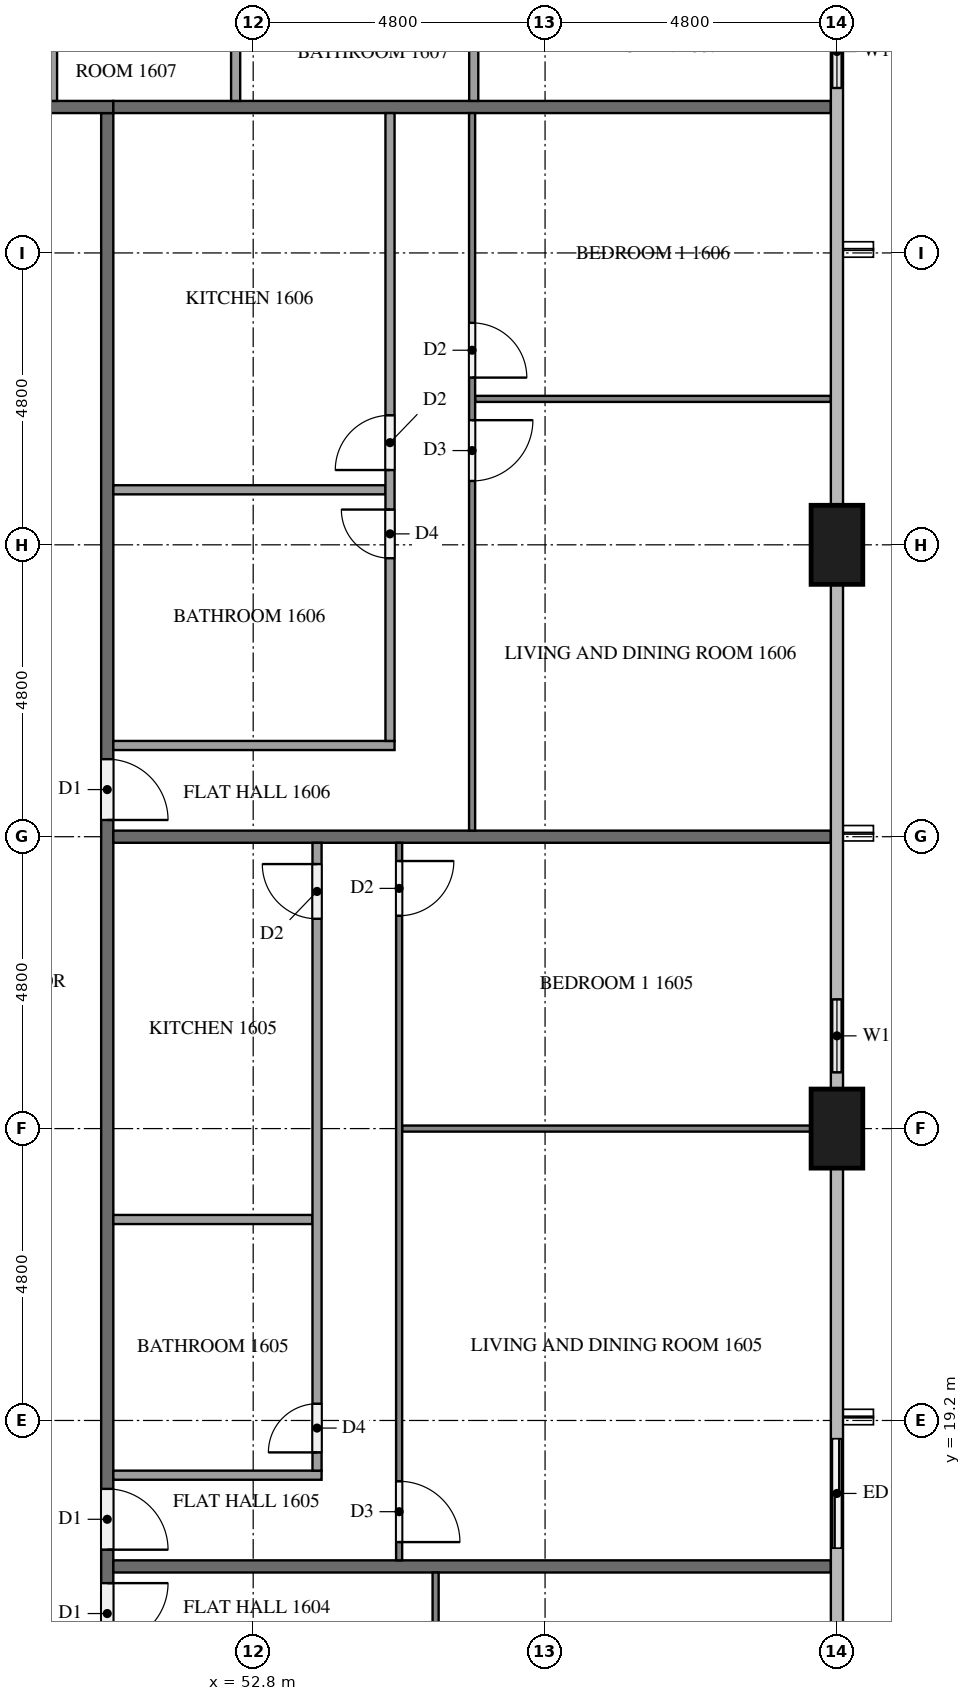
"""IFC4 building model, lengths in metres.
Left out: names, types, materials, properties, quantities, classifications, styles, units other than length and angle.
Written with IfcOpenShell. Run it as: python <this file> out.ifc"""

import sys

from ifc_helpers import new_model, si_unit, direction, frame, frame_2d, origin, origin_2d, place, context, subcontext, project, spatial, rectangle, extrude, element, fill, save


model = new_model("IFC4")
c1 = context("Model", 3, precision=1e-05, world=origin(), true_north=direction((0.0, 1.0)))
c2 = subcontext(c1, "Body", "Model", "MODEL_VIEW")
j1 = project(units=[si_unit("LENGTHUNIT", "METRE"), si_unit("PLANEANGLEUNIT", "RADIAN")], contexts=[c1])
p1 = place(None, origin())
s1 = spatial("IfcSite", under=j1, at=p1, CompositionType="ELEMENT")
p2 = place(p1, origin())
s2 = spatial("IfcBuilding", under=s1, at=p2, CompositionType="ELEMENT")
p3 = place(p2, frame((0.0, 0.0, 66.3)))
s3 = spatial("IfcBuildingStorey", under=s2, at=p3, CompositionType="ELEMENT", Elevation=66.3)
for number, where, z_axis, x_axis in (
    (1, (62.4, 24.0, 0.0), (0.0, 0.0, 1.0), (0.0, 1.0, 0.0)),
    (2, (62.4, 33.6, 0.0), (0.0, 0.0, 1.0), (0.0, 1.0, 0.0)),
):
    element("IfcColumn", number, at=place(p3, frame(where, z_axis=z_axis, x_axis=x_axis)), inside=s3, PredefinedType="COLUMN", context=c2, shape_type="SweptSolid", body=[
        extrude(rectangle(XDim=1.3, YDim=0.85, at=origin_2d()), origin(), (0.0, 0.0, 1.0), 3.2),
    ])
p4 = place(p3, frame((62.4, 16.8, 0.0), z_axis=(0.0, 0.0, 1.0), x_axis=(0.0, 1.0, 0.0)))
e3 = element("IfcWall", 3, at=p4, inside=s3, PredefinedType="SOLIDWALL", context=c2, shape_type="SweptSolid", body=[
    extrude(rectangle(XDim=2.4, YDim=0.15, at=frame_2d((1.2, 0.0))), origin(), (0.0, 0.0, 1.0), 3.2),
])
p5 = place(p4, frame((0.3, 0.0, 0.0)))
e4 = element("IfcOpeningElement", 4, at=p5, cuts=e3, PredefinedType="OPENING", context=c2, shape_type="SweptSolid", body=[
    extrude(rectangle(XDim=1.8, YDim=2.4, at=frame_2d((0.9, 1.2))), frame((0.0, 0.085, 0.0), z_axis=(0.0, -1.0, 0.0), x_axis=(1.0, 0.0, 0.0)), (0.0, 0.0, 1.0), 0.17),
])
p6 = place(p3, frame((62.4, 24.65, 0.0), z_axis=(0.0, 0.0, 1.0), x_axis=(0.0, 1.0, 0.0)))
e5 = element("IfcWall", 5, at=p6, inside=s3, PredefinedType="SOLIDWALL", context=c2, shape_type="SweptSolid", body=[
    extrude(rectangle(XDim=1.75, YDim=0.15, at=frame_2d((0.875, 0.0))), origin(), (0.0, 0.0, 1.0), 3.2),
])
p7 = place(p6, frame((0.275, 0.0, 0.9)))
e6 = element("IfcOpeningElement", 6, at=p7, cuts=e5, PredefinedType="OPENING", context=c2, shape_type="SweptSolid", body=[
    extrude(rectangle(XDim=1.2, YDim=1.4, at=frame_2d((0.6, 0.7))), frame((0.0, 0.085, 0.0), z_axis=(0.0, -1.0, 0.0), x_axis=(1.0, 0.0, 0.0)), (0.0, 0.0, 1.0), 0.17),
])
p8 = place(p3, frame((62.4, 40.8, 0.0), z_axis=(0.0, 0.0, 1.0), x_axis=(0.0, 1.0, 0.0)))
e7 = element("IfcWall", 7, at=p8, inside=s3, PredefinedType="SOLIDWALL", context=c2, shape_type="SweptSolid", body=[
    extrude(rectangle(XDim=1.825, YDim=0.15, at=frame_2d((0.913, 0.0))), origin(), (0.0, 0.0, 1.0), 3.2),
])
p9 = place(p8, frame((0.312, 0.0, 0.9)))
e8 = element("IfcOpeningElement", 8, at=p9, cuts=e7, PredefinedType="OPENING", context=c2, shape_type="SweptSolid", body=[
    extrude(rectangle(XDim=1.2, YDim=1.4, at=frame_2d((0.6, 0.7))), frame((0.0, 0.085, 0.0), z_axis=(0.0, -1.0, 0.0), x_axis=(1.0, 0.0, 0.0)), (0.0, 0.0, 1.0), 0.17),
])
p10 = place(p3, frame((50.4, 40.7, 0.0), z_axis=(0.0, 0.0, 1.0), x_axis=(0.0, -1.0, 0.0)))
e9 = element("IfcWall", 9, at=p10, inside=s3, PredefinedType="PARTITIONING", context=c2, shape_type="SweptSolid", body=[
    extrude(rectangle(XDim=28.6, YDim=0.2, at=frame_2d((14.3, 0.0))), origin(), (0.0, 0.0, 1.0), 3.2),
])
p11 = place(p10, frame((24.175, 0.0, 0.0)))
e10 = element("IfcOpeningElement", 10, at=p11, cuts=e9, PredefinedType="OPENING", context=c2, shape_type="SweptSolid", body=[
    extrude(rectangle(XDim=1.0, YDim=2.1, at=frame_2d((0.5, 1.05))), frame((0.0, 0.11, 0.0), z_axis=(0.0, -1.0, 0.0), x_axis=(1.0, 0.0, 0.0)), (0.0, 0.0, 1.0), 0.22),
])
p12 = place(p10, frame((22.625, 0.0, 0.0)))
e11 = element("IfcOpeningElement", 11, at=p12, cuts=e9, PredefinedType="OPENING", context=c2, shape_type="SweptSolid", body=[
    extrude(rectangle(XDim=1.0, YDim=2.1, at=frame_2d((0.5, 1.05))), frame((0.0, 0.11, 0.0), z_axis=(0.0, -1.0, 0.0), x_axis=(1.0, 0.0, 0.0)), (0.0, 0.0, 1.0), 0.22),
])
p13 = place(p10, frame((10.625, 0.0, 0.0)))
e12 = element("IfcOpeningElement", 12, at=p13, cuts=e9, PredefinedType="OPENING", context=c2, shape_type="SweptSolid", body=[
    extrude(rectangle(XDim=1.0, YDim=2.1, at=frame_2d((0.5, 1.05))), frame((0.0, 0.11, 0.0), z_axis=(0.0, -1.0, 0.0), x_axis=(1.0, 0.0, 0.0)), (0.0, 0.0, 1.0), 0.22),
])
p14 = place(p3, frame((11.9, 40.8, 0.0), z_axis=(0.0, 0.0, 1.0), x_axis=(1.0, 0.0, 0.0)))
e13 = element("IfcWall", 13, at=p14, inside=s3, PredefinedType="PARTITIONING", context=c2, shape_type="SweptSolid", body=[
    extrude(rectangle(XDim=38.6, YDim=0.2, at=frame_2d((19.3, 0.0))), origin(), (0.0, 0.0, 1.0), 3.2),
])
p15 = place(p14, frame((36.375, 0.0, 0.0)))
e14 = element("IfcOpeningElement", 14, at=p15, cuts=e13, PredefinedType="OPENING", context=c2, shape_type="SweptSolid", body=[
    extrude(rectangle(XDim=1.0, YDim=2.1, at=frame_2d((0.5, 1.05))), frame((0.0, 0.11, 0.0), z_axis=(0.0, -1.0, 0.0), x_axis=(1.0, 0.0, 0.0)), (0.0, 0.0, 1.0), 0.22),
])
p16 = place(p14, frame((17.125, 0.0, 0.0)))
e15 = element("IfcOpeningElement", 15, at=p16, cuts=e13, PredefinedType="OPENING", context=c2, shape_type="SweptSolid", body=[
    extrude(rectangle(XDim=1.1, YDim=2.1, at=frame_2d((0.55, 1.05))), frame((0.0, 0.11, 0.0), z_axis=(0.0, -1.0, 0.0), x_axis=(1.0, 0.0, 0.0)), (0.0, 0.0, 1.0), 0.22),
])
p17 = place(p14, frame((15.625, 0.0, 0.0)))
e16 = element("IfcOpeningElement", 16, at=p17, cuts=e13, PredefinedType="OPENING", context=c2, shape_type="SweptSolid", body=[
    extrude(rectangle(XDim=1.0, YDim=2.1, at=frame_2d((0.5, 1.05))), frame((0.0, 0.11, 0.0), z_axis=(0.0, -1.0, 0.0), x_axis=(1.0, 0.0, 0.0)), (0.0, 0.0, 1.0), 0.22),
])
p18 = place(p14, frame((1.225, 0.0, 0.0)))
e17 = element("IfcOpeningElement", 17, at=p18, cuts=e13, PredefinedType="OPENING", context=c2, shape_type="SweptSolid", body=[
    extrude(rectangle(XDim=1.0, YDim=2.1, at=frame_2d((0.5, 1.05))), frame((0.0, 0.11, 0.0), z_axis=(0.0, -1.0, 0.0), x_axis=(1.0, 0.0, 0.0)), (0.0, 0.0, 1.0), 0.22),
])
for number, where, z_axis, x_axis in (
    (18, (50.5, 16.8, 0.0), (0.0, 0.0, 1.0), (1.0, 0.0, 0.0)),
    (19, (50.5, 28.8, 0.0), (0.0, 0.0, 1.0), (1.0, 0.0, 0.0)),
    (20, (50.5, 40.8, 0.0), (0.0, 0.0, 1.0), (1.0, 0.0, 0.0)),
):
    element("IfcWall", number, at=place(p3, frame(where, z_axis=z_axis, x_axis=x_axis)), inside=s3, PredefinedType="PARTITIONING", context=c2, shape_type="SweptSolid", body=[
        extrude(rectangle(XDim=11.8, YDim=0.2, at=frame_2d((5.9, 0.0))), origin(), (0.0, 0.0, 1.0), 3.2),
    ])
p19 = place(p3, frame((55.8, 16.7, 0.0), z_axis=(0.0, 0.0, 1.0), x_axis=(0.0, -1.0, 0.0)))
e21 = element("IfcWall", 21, at=p19, inside=s3, PredefinedType="PARTITIONING", context=c2, shape_type="SweptSolid", body=[
    extrude(rectangle(XDim=16.6, YDim=0.1, at=frame_2d((8.3, 0.0))), origin(), (0.0, 0.0, 1.0), 3.2),
])
p20 = place(p19, frame((5.75, 0.0, 0.0)))
e22 = element("IfcOpeningElement", 22, at=p20, cuts=e21, PredefinedType="OPENING", context=c2, shape_type="SweptSolid", body=[
    extrude(rectangle(XDim=1.0, YDim=2.1, at=frame_2d((0.5, 1.05))), frame((0.0, 0.06, 0.0), z_axis=(0.0, -1.0, 0.0), x_axis=(1.0, 0.0, 0.0)), (0.0, 0.0, 1.0), 0.12),
])
p21 = place(p19, frame((7.45, 0.0, 0.0)))
e23 = element("IfcOpeningElement", 23, at=p21, cuts=e21, PredefinedType="OPENING", context=c2, shape_type="SweptSolid", body=[
    extrude(rectangle(XDim=0.9, YDim=2.1, at=frame_2d((0.45, 1.05))), frame((0.0, 0.06, 0.0), z_axis=(0.0, -1.0, 0.0), x_axis=(1.0, 0.0, 0.0)), (0.0, 0.0, 1.0), 0.12),
])
p22 = place(p19, frame((15.2, 0.0, 0.0)))
e24 = element("IfcOpeningElement", 24, at=p22, cuts=e21, PredefinedType="OPENING", context=c2, shape_type="SweptSolid", body=[
    extrude(rectangle(XDim=0.9, YDim=2.1, at=frame_2d((0.45, 1.05))), frame((0.0, 0.06, 0.0), z_axis=(0.0, -1.0, 0.0), x_axis=(1.0, 0.0, 0.0)), (0.0, 0.0, 1.0), 0.12),
])
p23 = place(p3, frame((55.25, 24.0, 0.0), z_axis=(0.0, 0.0, 1.0), x_axis=(1.0, 0.0, 0.0)))
e25 = element("IfcWall", 25, at=p23, inside=s3, PredefinedType="PARTITIONING", context=c2, shape_type="SweptSolid", body=[
    extrude(rectangle(XDim=6.725, YDim=0.1, at=frame_2d((3.363, 0.0))), origin(), (0.0, 0.0, 1.0), 3.2),
])
p24 = place(p3, frame((55.2, 28.7, 0.0), z_axis=(0.0, 0.0, 1.0), x_axis=(0.0, -1.0, 0.0)))
e26 = element("IfcWall", 26, at=p24, inside=s3, PredefinedType="PARTITIONING", context=c2, shape_type="SweptSolid", body=[
    extrude(rectangle(XDim=11.8, YDim=0.1, at=frame_2d((5.9, 0.0))), origin(), (0.0, 0.0, 1.0), 3.2),
])
p25 = place(p24, frame((10.5, 0.0, 0.0)))
e27 = element("IfcOpeningElement", 27, at=p25, cuts=e26, PredefinedType="OPENING", context=c2, shape_type="SweptSolid", body=[
    extrude(rectangle(XDim=1.0, YDim=2.1, at=frame_2d((0.5, 1.05))), frame((0.0, 0.06, 0.0), z_axis=(0.0, -1.0, 0.0), x_axis=(1.0, 0.0, 0.0)), (0.0, 0.0, 1.0), 0.12),
])
p26 = place(p24, frame((0.3, 0.0, 0.0)))
e28 = element("IfcOpeningElement", 28, at=p26, cuts=e26, PredefinedType="OPENING", context=c2, shape_type="SweptSolid", body=[
    extrude(rectangle(XDim=0.9, YDim=2.1, at=frame_2d((0.45, 1.05))), frame((0.0, 0.06, 0.0), z_axis=(0.0, -1.0, 0.0), x_axis=(1.0, 0.0, 0.0)), (0.0, 0.0, 1.0), 0.12),
])
p27 = place(p3, frame((50.5, 22.505, 0.0), z_axis=(0.0, 0.0, 1.0), x_axis=(1.0, 0.0, 0.0)))
e29 = element("IfcWall", 29, at=p27, inside=s3, PredefinedType="PARTITIONING", context=c2, shape_type="SweptSolid", body=[
    extrude(rectangle(XDim=3.275, YDim=0.15, at=frame_2d((1.637, 0.0))), origin(), (0.0, 0.0, 1.0), 3.2),
])
p28 = place(p3, frame((50.5, 18.3, 0.0), z_axis=(0.0, 0.0, 1.0), x_axis=(1.0, 0.0, 0.0)))
e30 = element("IfcWall", 30, at=p28, inside=s3, PredefinedType="PARTITIONING", context=c2, shape_type="SweptSolid", body=[
    extrude(rectangle(XDim=3.425, YDim=0.15, at=frame_2d((1.712, 0.0))), origin(), (0.0, 0.0, 1.0), 3.2),
])
p29 = place(p3, frame((53.85, 18.375, 0.0), z_axis=(0.0, 0.0, 1.0), x_axis=(0.0, 1.0, 0.0)))
e31 = element("IfcWall", 31, at=p29, inside=s3, PredefinedType="PARTITIONING", context=c2, shape_type="SweptSolid", body=[
    extrude(rectangle(XDim=10.325, YDim=0.15, at=frame_2d((5.163, 0.0))), origin(), (0.0, 0.0, 1.0), 3.2),
])
p30 = place(p29, frame((0.3, 0.0, 0.0)))
e32 = element("IfcOpeningElement", 32, at=p30, cuts=e31, PredefinedType="OPENING", context=c2, shape_type="SweptSolid", body=[
    extrude(rectangle(XDim=0.8, YDim=2.1, at=frame_2d((0.4, 1.05))), frame((0.0, 0.085, 0.0), z_axis=(0.0, -1.0, 0.0), x_axis=(1.0, 0.0, 0.0)), (0.0, 0.0, 1.0), 0.17),
])
p31 = place(p29, frame((9.075, 0.0, 0.0)))
e33 = element("IfcOpeningElement", 33, at=p31, cuts=e31, PredefinedType="OPENING", context=c2, shape_type="SweptSolid", body=[
    extrude(rectangle(XDim=0.9, YDim=2.1, at=frame_2d((0.45, 1.05))), frame((0.0, 0.085, 0.0), z_axis=(0.0, -1.0, 0.0), x_axis=(1.0, 0.0, 0.0)), (0.0, 0.0, 1.0), 0.17),
])
p32 = place(p3, frame((56.45, 36.0, 0.0), z_axis=(0.0, 0.0, 1.0), x_axis=(1.0, 0.0, 0.0)))
e34 = element("IfcWall", 34, at=p32, inside=s3, PredefinedType="PARTITIONING", context=c2, shape_type="SweptSolid", body=[
    extrude(rectangle(XDim=5.85, YDim=0.1, at=frame_2d((2.925, 0.0))), origin(), (0.0, 0.0, 1.0), 3.2),
])
p33 = place(p3, frame((56.4, 40.7, 0.0), z_axis=(0.0, 0.0, 1.0), x_axis=(0.0, -1.0, 0.0)))
e35 = element("IfcWall", 35, at=p33, inside=s3, PredefinedType="PARTITIONING", context=c2, shape_type="SweptSolid", body=[
    extrude(rectangle(XDim=11.8, YDim=0.1, at=frame_2d((5.9, 0.0))), origin(), (0.0, 0.0, 1.0), 3.2),
])
p34 = place(p33, frame((5.05, 0.0, 0.0)))
e36 = element("IfcOpeningElement", 36, at=p34, cuts=e35, PredefinedType="OPENING", context=c2, shape_type="SweptSolid", body=[
    extrude(rectangle(XDim=1.0, YDim=2.1, at=frame_2d((0.5, 1.05))), frame((0.0, 0.06, 0.0), z_axis=(0.0, -1.0, 0.0), x_axis=(1.0, 0.0, 0.0)), (0.0, 0.0, 1.0), 0.12),
])
p35 = place(p33, frame((3.45, 0.0, 0.0)))
e37 = element("IfcOpeningElement", 37, at=p35, cuts=e35, PredefinedType="OPENING", context=c2, shape_type="SweptSolid", body=[
    extrude(rectangle(XDim=0.9, YDim=2.1, at=frame_2d((0.45, 1.05))), frame((0.0, 0.06, 0.0), z_axis=(0.0, -1.0, 0.0), x_axis=(1.0, 0.0, 0.0)), (0.0, 0.0, 1.0), 0.12),
])
p36 = place(p3, frame((50.5, 34.505, 0.0), z_axis=(0.0, 0.0, 1.0), x_axis=(1.0, 0.0, 0.0)))
e38 = element("IfcWall", 38, at=p36, inside=s3, PredefinedType="PARTITIONING", context=c2, shape_type="SweptSolid", body=[
    extrude(rectangle(XDim=4.475, YDim=0.15, at=frame_2d((2.238, 0.0))), origin(), (0.0, 0.0, 1.0), 3.2),
])
p37 = place(p3, frame((50.5, 30.3, 0.0), z_axis=(0.0, 0.0, 1.0), x_axis=(1.0, 0.0, 0.0)))
e39 = element("IfcWall", 39, at=p37, inside=s3, PredefinedType="PARTITIONING", context=c2, shape_type="SweptSolid", body=[
    extrude(rectangle(XDim=4.625, YDim=0.15, at=frame_2d((2.312, 0.0))), origin(), (0.0, 0.0, 1.0), 3.2),
])
p38 = place(p3, frame((55.05, 30.375, 0.0), z_axis=(0.0, 0.0, 1.0), x_axis=(0.0, 1.0, 0.0)))
e40 = element("IfcWall", 40, at=p38, inside=s3, PredefinedType="PARTITIONING", context=c2, shape_type="SweptSolid", body=[
    extrude(rectangle(XDim=10.325, YDim=0.15, at=frame_2d((5.163, 0.0))), origin(), (0.0, 0.0, 1.0), 3.2),
])
p39 = place(p38, frame((3.005, 0.0, 0.0)))
e41 = element("IfcOpeningElement", 41, at=p39, cuts=e40, PredefinedType="OPENING", context=c2, shape_type="SweptSolid", body=[
    extrude(rectangle(XDim=0.8, YDim=2.1, at=frame_2d((0.4, 1.05))), frame((0.0, 0.085, 0.0), z_axis=(0.0, -1.0, 0.0), x_axis=(1.0, 0.0, 0.0)), (0.0, 0.0, 1.0), 0.17),
])
p40 = place(p38, frame((4.455, 0.0, 0.0)))
e42 = element("IfcOpeningElement", 42, at=p40, cuts=e40, PredefinedType="OPENING", context=c2, shape_type="SweptSolid", body=[
    extrude(rectangle(XDim=0.9, YDim=2.1, at=frame_2d((0.45, 1.05))), frame((0.0, 0.085, 0.0), z_axis=(0.0, -1.0, 0.0), x_axis=(1.0, 0.0, 0.0)), (0.0, 0.0, 1.0), 0.17),
])
for number, where, z_axis, x_axis in (
    (43, (52.511, 40.9, 0.0), (0.0, 0.0, 1.0), (0.0, 1.0, 0.0)),
    (44, (56.427, 40.9, 0.0), (0.0, 0.0, 1.0), (0.0, 1.0, 0.0)),
):
    element("IfcWall", number, at=place(p3, frame(where, z_axis=z_axis, x_axis=x_axis)), inside=s3, PredefinedType="PARTITIONING", context=c2, shape_type="SweptSolid", body=[
        extrude(rectangle(XDim=1.775, YDim=0.15, at=frame_2d((0.888, 0.0))), origin(), (0.0, 0.0, 1.0), 3.2),
    ])
p41 = place(p3, frame((49.5, 40.9, 0.0), z_axis=(0.0, 0.0, 1.0), x_axis=(0.0, 1.0, 0.0)))
e45 = element("IfcWall", 45, at=p41, inside=s3, PredefinedType="PARTITIONING", context=c2, shape_type="SweptSolid", body=[
    extrude(rectangle(XDim=1.925, YDim=0.15, at=frame_2d((0.962, 0.0))), origin(), (0.0, 0.0, 1.0), 3.2),
])
p42 = place(p5, origin())
e46 = element("IfcDoor", 46, at=p42, inside=s3, OperationType="SLIDING_TO_LEFT", PredefinedType="DOOR", context=c2, shape_type="SweptSolid", body=[
    extrude(rectangle(XDim=1.8, YDim=2.4, at=frame_2d((0.9, 1.2))), frame((0.0, 0.025, 0.0), z_axis=(0.0, -1.0, 0.0), x_axis=(1.0, 0.0, 0.0)), (0.0, 0.0, 1.0), 0.05),
])
fill(e4, e46)
p43 = place(p7, origin())
e47 = element("IfcWindow", 47, at=p43, inside=s3, PartitioningType="SINGLE_PANEL", PredefinedType="WINDOW", context=c2, shape_type="SweptSolid", body=[
    extrude(rectangle(XDim=1.2, YDim=1.4, at=frame_2d((0.6, 0.7))), frame((0.0, 0.03, 0.0), z_axis=(0.0, -1.0, 0.0), x_axis=(1.0, 0.0, 0.0)), (0.0, 0.0, 1.0), 0.06),
])
fill(e6, e47)
p44 = place(p9, origin())
e48 = element("IfcWindow", 48, at=p44, inside=s3, PartitioningType="SINGLE_PANEL", PredefinedType="WINDOW", context=c2, shape_type="SweptSolid", body=[
    extrude(rectangle(XDim=1.2, YDim=1.4, at=frame_2d((0.6, 0.7))), frame((0.0, 0.03, 0.0), z_axis=(0.0, -1.0, 0.0), x_axis=(1.0, 0.0, 0.0)), (0.0, 0.0, 1.0), 0.06),
])
fill(e8, e48)
p45 = place(p11, origin())
e49 = element("IfcDoor", 49, at=p45, inside=s3, OperationType="SINGLE_SWING_LEFT", PredefinedType="DOOR", context=c2, shape_type="SweptSolid", body=[
    extrude(rectangle(XDim=1.0, YDim=2.1, at=frame_2d((0.5, 1.05))), frame((0.0, 0.025, 0.0), z_axis=(0.0, -1.0, 0.0), x_axis=(1.0, 0.0, 0.0)), (0.0, 0.0, 1.0), 0.05),
])
fill(e10, e49)
p46 = place(p12, origin())
e50 = element("IfcDoor", 50, at=p46, inside=s3, OperationType="SINGLE_SWING_RIGHT", PredefinedType="DOOR", context=c2, shape_type="SweptSolid", body=[
    extrude(rectangle(XDim=1.0, YDim=2.1, at=frame_2d((0.5, 1.05))), frame((0.0, 0.025, 0.0), z_axis=(0.0, -1.0, 0.0), x_axis=(1.0, 0.0, 0.0)), (0.0, 0.0, 1.0), 0.05),
])
fill(e11, e50)
p47 = place(p13, origin())
e51 = element("IfcDoor", 51, at=p47, inside=s3, OperationType="SINGLE_SWING_RIGHT", PredefinedType="DOOR", context=c2, shape_type="SweptSolid", body=[
    extrude(rectangle(XDim=1.0, YDim=2.1, at=frame_2d((0.5, 1.05))), frame((0.0, 0.025, 0.0), z_axis=(0.0, -1.0, 0.0), x_axis=(1.0, 0.0, 0.0)), (0.0, 0.0, 1.0), 0.05),
])
fill(e12, e51)
p48 = place(p25, origin())
e52 = element("IfcDoor", 52, at=p48, inside=s3, OperationType="SINGLE_SWING_RIGHT", PredefinedType="DOOR", context=c2, shape_type="SweptSolid", body=[
    extrude(rectangle(XDim=1.0, YDim=2.1, at=frame_2d((0.5, 1.05))), frame((0.0, 0.025, 0.0), z_axis=(0.0, -1.0, 0.0), x_axis=(1.0, 0.0, 0.0)), (0.0, 0.0, 1.0), 0.05),
])
fill(e27, e52)
p49 = place(p26, origin())
e53 = element("IfcDoor", 53, at=p49, inside=s3, OperationType="SINGLE_SWING_LEFT", PredefinedType="DOOR", context=c2, shape_type="SweptSolid", body=[
    extrude(rectangle(XDim=0.9, YDim=2.1, at=frame_2d((0.45, 1.05))), frame((0.0, 0.025, 0.0), z_axis=(0.0, -1.0, 0.0), x_axis=(1.0, 0.0, 0.0)), (0.0, 0.0, 1.0), 0.05),
])
fill(e28, e53)
p50 = place(p30, origin())
e54 = element("IfcDoor", 54, at=p50, inside=s3, OperationType="SINGLE_SWING_LEFT", PredefinedType="DOOR", context=c2, shape_type="SweptSolid", body=[
    extrude(rectangle(XDim=0.8, YDim=2.1, at=frame_2d((0.4, 1.05))), frame((0.0, 0.025, 0.0), z_axis=(0.0, -1.0, 0.0), x_axis=(1.0, 0.0, 0.0)), (0.0, 0.0, 1.0), 0.05),
])
fill(e32, e54)
p51 = place(p31, origin())
e55 = element("IfcDoor", 55, at=p51, inside=s3, OperationType="SINGLE_SWING_RIGHT", PredefinedType="DOOR", context=c2, shape_type="SweptSolid", body=[
    extrude(rectangle(XDim=0.9, YDim=2.1, at=frame_2d((0.45, 1.05))), frame((0.0, 0.025, 0.0), z_axis=(0.0, -1.0, 0.0), x_axis=(1.0, 0.0, 0.0)), (0.0, 0.0, 1.0), 0.05),
])
fill(e33, e55)
p52 = place(p34, origin())
e56 = element("IfcDoor", 56, at=p52, inside=s3, OperationType="SINGLE_SWING_LEFT", PredefinedType="DOOR", context=c2, shape_type="SweptSolid", body=[
    extrude(rectangle(XDim=1.0, YDim=2.1, at=frame_2d((0.5, 1.05))), frame((0.0, 0.025, 0.0), z_axis=(0.0, -1.0, 0.0), x_axis=(1.0, 0.0, 0.0)), (0.0, 0.0, 1.0), 0.05),
])
fill(e36, e56)
p53 = place(p35, origin())
e57 = element("IfcDoor", 57, at=p53, inside=s3, OperationType="SINGLE_SWING_RIGHT", PredefinedType="DOOR", context=c2, shape_type="SweptSolid", body=[
    extrude(rectangle(XDim=0.9, YDim=2.1, at=frame_2d((0.45, 1.05))), frame((0.0, 0.025, 0.0), z_axis=(0.0, -1.0, 0.0), x_axis=(1.0, 0.0, 0.0)), (0.0, 0.0, 1.0), 0.05),
])
fill(e37, e57)
p54 = place(p39, origin())
e58 = element("IfcDoor", 58, at=p54, inside=s3, OperationType="SINGLE_SWING_RIGHT", PredefinedType="DOOR", context=c2, shape_type="SweptSolid", body=[
    extrude(rectangle(XDim=0.8, YDim=2.1, at=frame_2d((0.4, 1.05))), frame((0.0, 0.025, 0.0), z_axis=(0.0, -1.0, 0.0), x_axis=(1.0, 0.0, 0.0)), (0.0, 0.0, 1.0), 0.05),
])
fill(e41, e58)
p55 = place(p40, origin())
e59 = element("IfcDoor", 59, at=p55, inside=s3, OperationType="SINGLE_SWING_LEFT", PredefinedType="DOOR", context=c2, shape_type="SweptSolid", body=[
    extrude(rectangle(XDim=0.9, YDim=2.1, at=frame_2d((0.45, 1.05))), frame((0.0, 0.025, 0.0), z_axis=(0.0, -1.0, 0.0), x_axis=(1.0, 0.0, 0.0)), (0.0, 0.0, 1.0), 0.05),
])
fill(e42, e59)
save(model, sys.argv[1])
